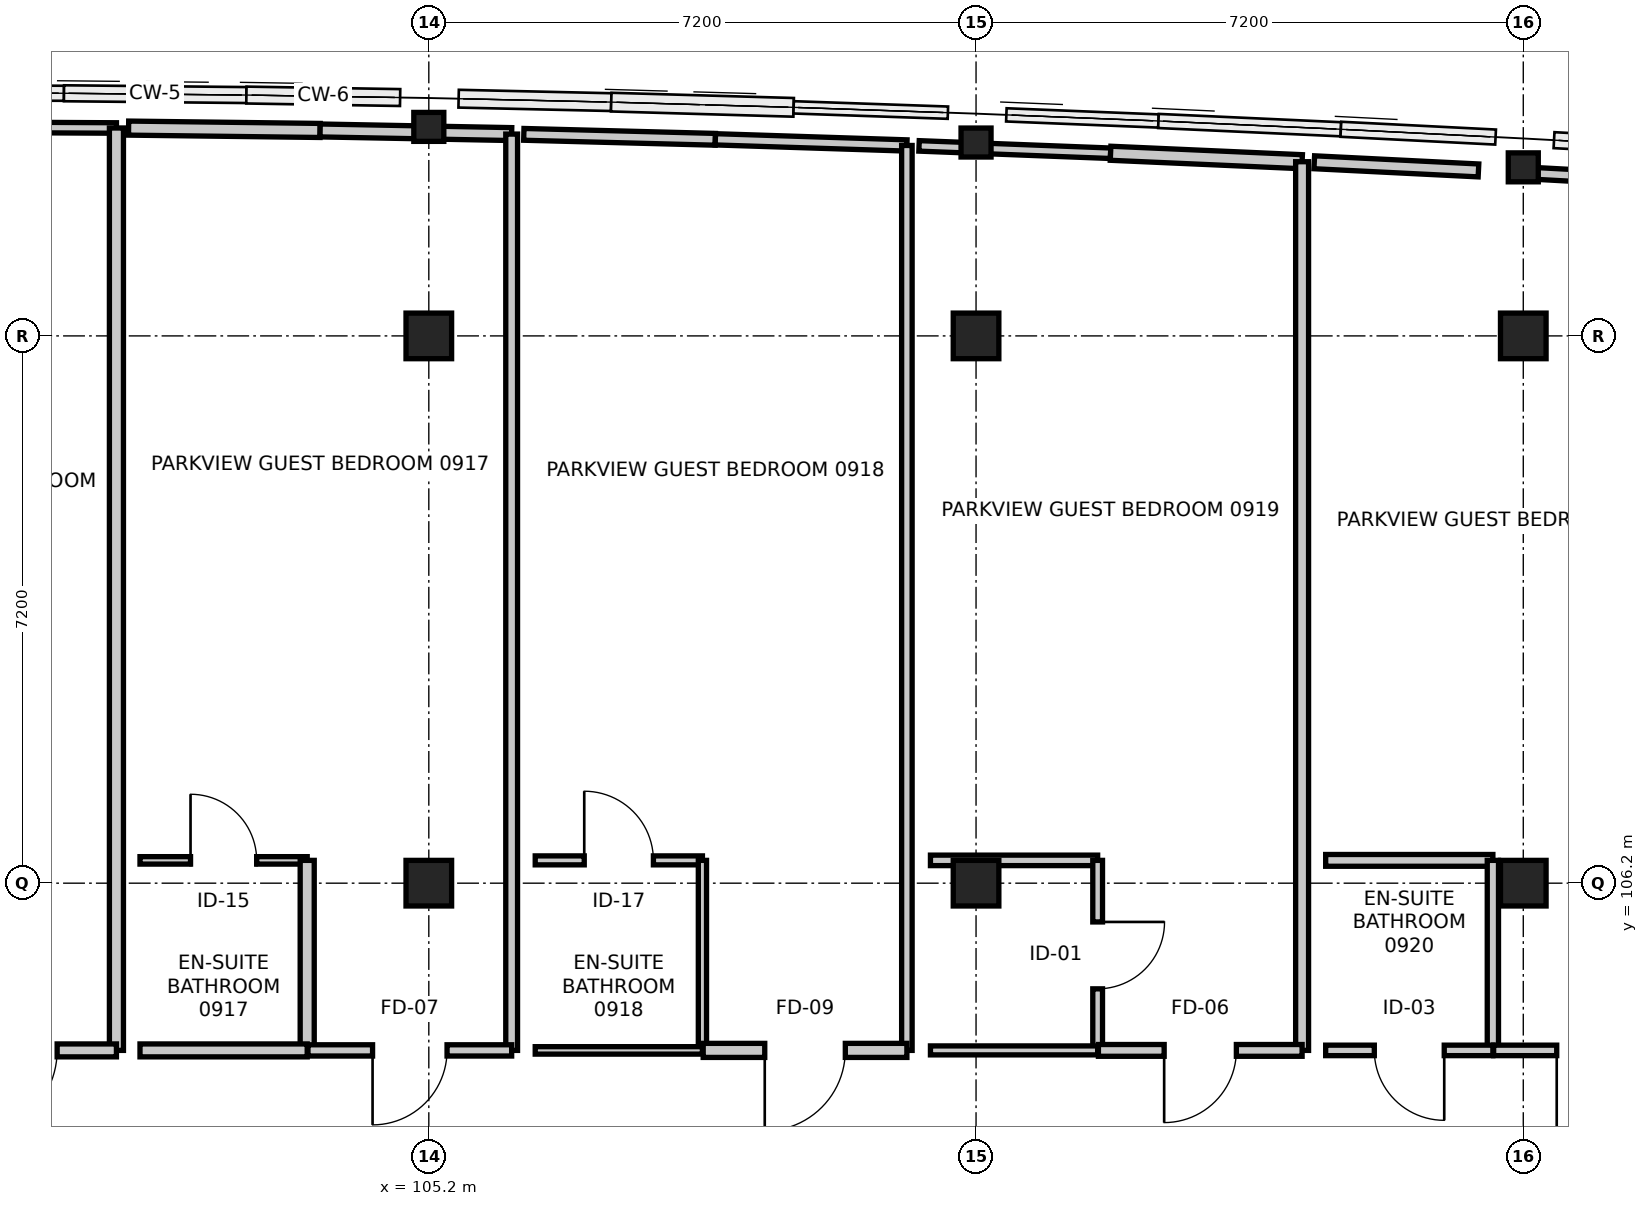
"""IFC4 building model, lengths in metres.
Left out: names, types, materials, properties, quantities, classifications, styles, units other than length and angle.
Written with IfcOpenShell. Run it as: python <this file> out.ifc"""

import sys

from ifc_helpers import new_model, si_unit, direction, frame, frame_2d, origin, origin_2d, place, context, subcontext, project, spatial, rectangle, i_section, extrude, element, fill, save


model = new_model("IFC4")
c1 = context("Model", 3, precision=1e-05, world=origin(), true_north=direction((0.0, 1.0)))
c2 = subcontext(c1, "Body", "Model", "MODEL_VIEW")
j1 = project(units=[si_unit("LENGTHUNIT", "METRE"), si_unit("PLANEANGLEUNIT", "RADIAN")], contexts=[c1])
p1 = place(None, origin())
s1 = spatial("IfcSite", under=j1, at=p1, CompositionType="ELEMENT")
p2 = place(p1, origin())
s2 = spatial("IfcBuilding", under=s1, at=p2, CompositionType="ELEMENT")
p3 = place(p2, frame((0.0, 0.0, 37.2)))
s3 = spatial("IfcBuildingStorey", under=s2, at=p3, CompositionType="ELEMENT", Elevation=37.2)
for number, where, z_axis, x_axis in (
    (1, (105.2, 106.2, 0.0), (0.0, 0.0, 1.0), (1.0, 0.0, 0.0)),
    (2, (105.2, 113.4, 0.0), (0.0, 0.0, 1.0), (1.0, 0.0, 0.0)),
):
    element("IfcColumn", number, at=place(p3, frame(where, z_axis=z_axis, x_axis=x_axis)), inside=s3, PredefinedType="COLUMN", context=c2, shape_type="SweptSolid", body=[
        extrude(rectangle(XDim=0.6, YDim=0.6, at=origin_2d()), origin(), (0.0, 0.0, 1.0), 3.6),
    ])
p4 = place(p3, frame((105.2, 116.15, 0.0), z_axis=(0.0, 0.0, 1.0), x_axis=(1.0, 0.0, 0.0)))
e3 = element("IfcColumn", 3, at=p4, inside=s3, PredefinedType="COLUMN", context=c2, shape_type="SweptSolid", body=[
    extrude(i_section(OverallWidth=0.395, OverallDepth=0.381, WebThickness=0.018, FlangeThickness=0.03, FilletRadius=0.015, at=origin_2d()), origin(), (0.0, 0.0, 1.0), 3.6),
])
for number, where, z_axis, x_axis in (
    (4, (112.4, 106.2, 0.0), (0.0, 0.0, 1.0), (1.0, 0.0, 0.0)),
    (5, (112.4, 113.4, 0.0), (0.0, 0.0, 1.0), (1.0, 0.0, 0.0)),
):
    element("IfcColumn", number, at=place(p3, frame(where, z_axis=z_axis, x_axis=x_axis)), inside=s3, PredefinedType="COLUMN", context=c2, shape_type="SweptSolid", body=[
        extrude(rectangle(XDim=0.6, YDim=0.6, at=origin_2d()), origin(), (0.0, 0.0, 1.0), 3.6),
    ])
p5 = place(p3, frame((112.4, 115.944, 0.0), z_axis=(0.0, 0.0, 1.0), x_axis=(1.0, 0.0, 0.0)))
e6 = element("IfcColumn", 6, at=p5, inside=s3, PredefinedType="COLUMN", context=c2, shape_type="SweptSolid", body=[
    extrude(i_section(OverallWidth=0.395, OverallDepth=0.381, WebThickness=0.018, FlangeThickness=0.03, FilletRadius=0.015, at=origin_2d()), origin(), (0.0, 0.0, 1.0), 3.6),
])
for number, where, z_axis, x_axis in (
    (7, (119.6, 106.2, 0.0), (0.0, 0.0, 1.0), (1.0, 0.0, 0.0)),
    (8, (119.6, 113.4, 0.0), (0.0, 0.0, 1.0), (1.0, 0.0, 0.0)),
):
    element("IfcColumn", number, at=place(p3, frame(where, z_axis=z_axis, x_axis=x_axis)), inside=s3, PredefinedType="COLUMN", context=c2, shape_type="SweptSolid", body=[
        extrude(rectangle(XDim=0.6, YDim=0.6, at=origin_2d()), origin(), (0.0, 0.0, 1.0), 3.6),
    ])
p6 = place(p3, frame((119.6, 115.618, 0.0), z_axis=(0.0, 0.0, 1.0), x_axis=(1.0, 0.0, 0.0)))
e9 = element("IfcColumn", 9, at=p6, inside=s3, PredefinedType="COLUMN", context=c2, shape_type="SweptSolid", body=[
    extrude(i_section(OverallWidth=0.395, OverallDepth=0.381, WebThickness=0.018, FlangeThickness=0.03, FilletRadius=0.015, at=origin_2d()), origin(), (0.0, 0.0, 1.0), 3.6),
])
p7 = place(p3, frame((98.57, 116.148, 0.0), z_axis=(0.0, 0.0, 1.0), x_axis=(0.999987310611, -0.005037719449, 0.0)))
e10 = element("IfcWall", 10, at=p7, inside=s3, PredefinedType="PARTITIONING", context=c2, shape_type="SweptSolid", body=[
    extrude(rectangle(XDim=2.52, YDim=0.138, at=frame_2d((1.26, 0.0))), origin(), (0.0, 0.0, 1.0), 2.956),
])
p8 = place(p3, frame((101.09, 116.135, 0.0), z_axis=(0.0, 0.0, 1.0), x_axis=(0.0, -1.0, 0.0)))
e11 = element("IfcWall", 11, at=p8, inside=s3, PredefinedType="PARTITIONING", context=c2, shape_type="SweptSolid", body=[
    extrude(rectangle(XDim=12.135, YDim=0.185, at=frame_2d((6.068, 0.0))), origin(), (0.0, 0.0, 1.0), 2.765),
])
p9 = place(p3, frame((101.09, 104.0, 0.0), z_axis=(0.0, 0.0, 1.0), x_axis=(-1.0, 0.0, 0.0)))
e12 = element("IfcWall", 12, at=p9, inside=s3, PredefinedType="PARTITIONING", context=c2, shape_type="SweptSolid", body=[
    extrude(rectangle(XDim=2.68, YDim=0.17, at=frame_2d((1.34, 0.0))), origin(), (0.0, 0.0, 1.0), 3.38),
])
p10 = place(p9, frame((0.78, 0.0, 0.0)))
e13 = element("IfcOpeningElement", 13, at=p10, cuts=e12, PredefinedType="OPENING", context=c2, shape_type="SweptSolid", body=[
    extrude(rectangle(XDim=1.12, YDim=2.2, at=frame_2d((0.56, 1.1))), frame((0.0, 0.095, 0.0), z_axis=(0.0, -1.0, 0.0), x_axis=(1.0, 0.0, 0.0)), (0.0, 0.0, 1.0), 0.19),
])
p11 = place(p3, frame((101.4, 106.5, 0.0), z_axis=(0.0, 0.0, 1.0), x_axis=(1.0, 0.0, 0.0)))
e14 = element("IfcWall", 14, at=p11, inside=s3, PredefinedType="PARTITIONING", context=c2, shape_type="SweptSolid", body=[
    extrude(rectangle(XDim=2.2, YDim=0.098, at=frame_2d((1.1, 0.0))), origin(), (0.0, 0.0, 1.0), 3.38),
])
p12 = place(p11, frame((0.665, 0.0, 0.0)))
e15 = element("IfcOpeningElement", 15, at=p12, cuts=e14, PredefinedType="OPENING", context=c2, shape_type="SweptSolid", body=[
    extrude(rectangle(XDim=0.87, YDim=2.07, at=frame_2d((0.435, 1.035))), frame((0.0, 0.059, 0.0), z_axis=(0.0, -1.0, 0.0), x_axis=(1.0, 0.0, 0.0)), (0.0, 0.0, 1.0), 0.118),
])
p13 = place(p3, frame((103.6, 106.5, 0.0), z_axis=(0.0, 0.0, 1.0), x_axis=(0.0, -1.0, 0.0)))
e16 = element("IfcWall", 16, at=p13, inside=s3, PredefinedType="PARTITIONING", context=c2, shape_type="SweptSolid", body=[
    extrude(rectangle(XDim=2.5, YDim=0.185, at=frame_2d((1.25, 0.0))), origin(), (0.0, 0.0, 1.0), 2.765),
])
p14 = place(p3, frame((103.6, 104.0, 0.0), z_axis=(0.0, 0.0, 1.0), x_axis=(-1.0, 0.0, 0.0)))
e17 = element("IfcWall", 17, at=p14, inside=s3, PredefinedType="PARTITIONING", context=c2, shape_type="SweptSolid", body=[
    extrude(rectangle(XDim=2.2, YDim=0.17, at=frame_2d((1.1, 0.0))), origin(), (0.0, 0.0, 1.0), 3.38),
])
p15 = place(p3, frame((101.25, 116.134, 0.0), z_axis=(0.0, 0.0, 1.0), x_axis=(0.999925503674, -0.012206027268, 0.0)))
e18 = element("IfcWall", 18, at=p15, inside=s3, PredefinedType="PARTITIONING", context=c2, shape_type="SweptSolid", body=[
    extrude(rectangle(XDim=2.52, YDim=0.185, at=frame_2d((1.26, 0.0))), origin(), (0.0, 0.0, 1.0), 2.956),
])
p16 = place(p3, frame((103.77, 116.103, 0.0), z_axis=(0.0, 0.0, 1.0), x_axis=(0.999819765879, -0.018985145719, 0.0)))
e19 = element("IfcWall", 19, at=p16, inside=s3, PredefinedType="PARTITIONING", context=c2, shape_type="SweptSolid", body=[
    extrude(rectangle(XDim=2.521, YDim=0.17, at=frame_2d((1.26, 0.0))), origin(), (0.0, 0.0, 1.0), 2.956),
])
p17 = place(p3, frame((106.29, 116.055, 0.0), z_axis=(0.0, 0.0, 1.0), x_axis=(0.0, -1.0, 0.0)))
e20 = element("IfcWall", 20, at=p17, inside=s3, PredefinedType="PARTITIONING", context=c2, shape_type="SweptSolid", body=[
    extrude(rectangle(XDim=12.055, YDim=0.155, at=frame_2d((6.028, 0.0))), origin(), (0.0, 0.0, 1.0), 2.765),
])
p18 = place(p3, frame((106.29, 104.0, 0.0), z_axis=(0.0, 0.0, 1.0), x_axis=(-1.0, 0.0, 0.0)))
e21 = element("IfcWall", 21, at=p18, inside=s3, PredefinedType="PARTITIONING", context=c2, shape_type="SweptSolid", body=[
    extrude(rectangle(XDim=2.68, YDim=0.148, at=frame_2d((1.34, 0.0))), origin(), (0.0, 0.0, 1.0), 2.715),
])
p19 = place(p18, frame((0.85, 0.0, 0.0)))
e22 = element("IfcOpeningElement", 22, at=p19, cuts=e21, PredefinedType="OPENING", context=c2, shape_type="SweptSolid", body=[
    extrude(rectangle(XDim=0.98, YDim=2.15, at=frame_2d((0.49, 1.075))), frame((0.0, 0.084, 0.0), z_axis=(0.0, -1.0, 0.0), x_axis=(1.0, 0.0, 0.0)), (0.0, 0.0, 1.0), 0.168),
])
p20 = place(p3, frame((106.6, 106.5, 0.0), z_axis=(0.0, 0.0, 1.0), x_axis=(1.0, 0.0, 0.0)))
e23 = element("IfcWall", 23, at=p20, inside=s3, PredefinedType="PARTITIONING", context=c2, shape_type="SweptSolid", body=[
    extrude(rectangle(XDim=2.2, YDim=0.118, at=frame_2d((1.1, 0.0))), origin(), (0.0, 0.0, 1.0), 3.38),
])
p21 = place(p20, frame((0.645, 0.0, 0.0)))
e24 = element("IfcOpeningElement", 24, at=p21, cuts=e23, PredefinedType="OPENING", context=c2, shape_type="SweptSolid", body=[
    extrude(rectangle(XDim=0.91, YDim=2.11, at=frame_2d((0.455, 1.055))), frame((0.0, 0.069, 0.0), z_axis=(0.0, -1.0, 0.0), x_axis=(1.0, 0.0, 0.0)), (0.0, 0.0, 1.0), 0.138),
])
p22 = place(p3, frame((108.8, 106.5, 0.0), z_axis=(0.0, 0.0, 1.0), x_axis=(0.0, -1.0, 0.0)))
e25 = element("IfcWall", 25, at=p22, inside=s3, PredefinedType="PARTITIONING", context=c2, shape_type="SweptSolid", body=[
    extrude(rectangle(XDim=2.5, YDim=0.108, at=frame_2d((1.25, 0.0))), origin(), (0.0, 0.0, 1.0), 2.765),
])
p23 = place(p3, frame((108.8, 104.0, 0.0), z_axis=(0.0, 0.0, 1.0), x_axis=(-1.0, 0.0, 0.0)))
e26 = element("IfcWall", 26, at=p23, inside=s3, PredefinedType="PARTITIONING", context=c2, shape_type="SweptSolid", body=[
    extrude(rectangle(XDim=2.2, YDim=0.098, at=frame_2d((1.1, 0.0))), origin(), (0.0, 0.0, 1.0), 3.38),
])
p24 = place(p3, frame((106.45, 116.052, 0.0), z_axis=(0.0, 0.0, 1.0), x_axis=(0.99966561488, -0.025858430457, 0.0)))
e27 = element("IfcWall", 27, at=p24, inside=s3, PredefinedType="PARTITIONING", context=c2, shape_type="SweptSolid", body=[
    extrude(rectangle(XDim=2.521, YDim=0.155, at=frame_2d((1.26, 0.0))), origin(), (0.0, 0.0, 1.0), 2.956),
])
p25 = place(p3, frame((108.97, 115.986, 0.0), z_axis=(0.0, 0.0, 1.0), x_axis=(0.999486236207, -0.032050953709, 0.0)))
e28 = element("IfcWall", 28, at=p25, inside=s3, PredefinedType="PARTITIONING", context=c2, shape_type="SweptSolid", body=[
    extrude(rectangle(XDim=2.521, YDim=0.148, at=frame_2d((1.261, 0.0))), origin(), (0.0, 0.0, 1.0), 2.956),
])
p26 = place(p3, frame((111.49, 115.906, 0.0), z_axis=(0.0, 0.0, 1.0), x_axis=(0.0, -1.0, 0.0)))
e29 = element("IfcWall", 29, at=p26, inside=s3, PredefinedType="PARTITIONING", context=c2, shape_type="SweptSolid", body=[
    extrude(rectangle(XDim=11.906, YDim=0.138, at=frame_2d((5.953, 0.0))), origin(), (0.0, 0.0, 1.0), 2.765),
])
p27 = place(p3, frame((111.49, 104.0, 0.0), z_axis=(0.0, 0.0, 1.0), x_axis=(-1.0, 0.0, 0.0)))
e30 = element("IfcWall", 30, at=p27, inside=s3, PredefinedType="PARTITIONING", context=c2, shape_type="SweptSolid", body=[
    extrude(rectangle(XDim=2.68, YDim=0.185, at=frame_2d((1.34, 0.0))), origin(), (0.0, 0.0, 1.0), 3.38),
])
p28 = place(p27, frame((0.81, 0.0, 0.0)))
e31 = element("IfcOpeningElement", 31, at=p28, cuts=e30, PredefinedType="OPENING", context=c2, shape_type="SweptSolid", body=[
    extrude(rectangle(XDim=1.06, YDim=2.2, at=frame_2d((0.53, 1.1))), frame((0.0, 0.103, 0.0), z_axis=(0.0, -1.0, 0.0), x_axis=(1.0, 0.0, 0.0)), (0.0, 0.0, 1.0), 0.205),
])
p29 = place(p3, frame((111.8, 106.5, 0.0), z_axis=(0.0, 0.0, 1.0), x_axis=(1.0, 0.0, 0.0)))
e32 = element("IfcWall", 32, at=p29, inside=s3, PredefinedType="PARTITIONING", context=c2, shape_type="SweptSolid", body=[
    extrude(rectangle(XDim=2.2, YDim=0.138, at=frame_2d((1.1, 0.0))), origin(), (0.0, 0.0, 1.0), 2.715),
])
p30 = place(p3, frame((114.0, 106.5, 0.0), z_axis=(0.0, 0.0, 1.0), x_axis=(0.0, -1.0, 0.0)))
e33 = element("IfcWall", 33, at=p30, inside=s3, PredefinedType="PARTITIONING", context=c2, shape_type="SweptSolid", body=[
    extrude(rectangle(XDim=2.5, YDim=0.128, at=frame_2d((1.25, 0.0))), origin(), (0.0, 0.0, 1.0), 2.765),
])
p31 = place(p30, frame((0.81, 0.0, 0.0)))
e34 = element("IfcOpeningElement", 34, at=p31, cuts=e33, PredefinedType="OPENING", context=c2, shape_type="SweptSolid", body=[
    extrude(rectangle(XDim=0.88, YDim=2.06, at=frame_2d((0.44, 1.03))), frame((0.0, 0.074, 0.0), z_axis=(0.0, -1.0, 0.0), x_axis=(1.0, 0.0, 0.0)), (0.0, 0.0, 1.0), 0.148),
])
p32 = place(p3, frame((114.0, 104.0, 0.0), z_axis=(0.0, 0.0, 1.0), x_axis=(-1.0, 0.0, 0.0)))
e35 = element("IfcWall", 35, at=p32, inside=s3, PredefinedType="PARTITIONING", context=c2, shape_type="SweptSolid", body=[
    extrude(rectangle(XDim=2.2, YDim=0.118, at=frame_2d((1.1, 0.0))), origin(), (0.0, 0.0, 1.0), 2.715),
])
p33 = place(p3, frame((111.65, 115.9, 0.0), z_axis=(0.0, 0.0, 1.0), x_axis=(0.999261174631, -0.038433122101, 0.0)))
e36 = element("IfcWall", 36, at=p33, inside=s3, PredefinedType="PARTITIONING", context=c2, shape_type="SweptSolid", body=[
    extrude(rectangle(XDim=2.522, YDim=0.138, at=frame_2d((1.261, 0.0))), origin(), (0.0, 0.0, 1.0), 2.956),
])
p34 = place(p3, frame((114.17, 115.803, 0.0), z_axis=(0.0, 0.0, 1.0), x_axis=(0.999025600943, -0.044134438484, 0.0)))
e37 = element("IfcWall", 37, at=p34, inside=s3, PredefinedType="PARTITIONING", context=c2, shape_type="SweptSolid", body=[
    extrude(rectangle(XDim=2.522, YDim=0.185, at=frame_2d((1.261, 0.0))), origin(), (0.0, 0.0, 1.0), 2.956),
])
p35 = place(p3, frame((116.69, 115.692, 0.0), z_axis=(0.0, 0.0, 1.0), x_axis=(0.0, -1.0, 0.0)))
e38 = element("IfcWall", 38, at=p35, inside=s3, PredefinedType="PARTITIONING", context=c2, shape_type="SweptSolid", body=[
    extrude(rectangle(XDim=11.692, YDim=0.17, at=frame_2d((5.846, 0.0))), origin(), (0.0, 0.0, 1.0), 2.765),
])
p36 = place(p3, frame((116.69, 104.0, 0.0), z_axis=(0.0, 0.0, 1.0), x_axis=(-1.0, 0.0, 0.0)))
e39 = element("IfcWall", 39, at=p36, inside=s3, PredefinedType="PARTITIONING", context=c2, shape_type="SweptSolid", body=[
    extrude(rectangle(XDim=2.68, YDim=0.155, at=frame_2d((1.34, 0.0))), origin(), (0.0, 0.0, 1.0), 3.38),
])
p37 = place(p36, frame((0.865, 0.0, 0.0)))
e40 = element("IfcOpeningElement", 40, at=p37, cuts=e39, PredefinedType="OPENING", context=c2, shape_type="SweptSolid", body=[
    extrude(rectangle(XDim=0.95, YDim=2.1, at=frame_2d((0.475, 1.05))), frame((0.0, 0.087, 0.0), z_axis=(0.0, -1.0, 0.0), x_axis=(1.0, 0.0, 0.0)), (0.0, 0.0, 1.0), 0.175),
])
p38 = place(p3, frame((117.0, 106.5, 0.0), z_axis=(0.0, 0.0, 1.0), x_axis=(1.0, 0.0, 0.0)))
e41 = element("IfcWall", 41, at=p38, inside=s3, PredefinedType="PARTITIONING", context=c2, shape_type="SweptSolid", body=[
    extrude(rectangle(XDim=2.2, YDim=0.155, at=frame_2d((1.1, 0.0))), origin(), (0.0, 0.0, 1.0), 3.38),
])
p39 = place(p3, frame((119.2, 106.5, 0.0), z_axis=(0.0, 0.0, 1.0), x_axis=(0.0, -1.0, 0.0)))
e42 = element("IfcWall", 42, at=p39, inside=s3, PredefinedType="PARTITIONING", context=c2, shape_type="SweptSolid", body=[
    extrude(rectangle(XDim=2.5, YDim=0.148, at=frame_2d((1.25, 0.0))), origin(), (0.0, 0.0, 1.0), 2.765),
])
p40 = place(p3, frame((119.2, 104.0, 0.0), z_axis=(0.0, 0.0, 1.0), x_axis=(-1.0, 0.0, 0.0)))
e43 = element("IfcWall", 43, at=p40, inside=s3, PredefinedType="PARTITIONING", context=c2, shape_type="SweptSolid", body=[
    extrude(rectangle(XDim=2.2, YDim=0.138, at=frame_2d((1.1, 0.0))), origin(), (0.0, 0.0, 1.0), 3.38),
])
p41 = place(p40, frame((0.64, 0.0, 0.0)))
e44 = element("IfcOpeningElement", 44, at=p41, cuts=e43, PredefinedType="OPENING", context=c2, shape_type="SweptSolid", body=[
    extrude(rectangle(XDim=0.92, YDim=2.1, at=frame_2d((0.46, 1.05))), frame((0.0, 0.079, 0.0), z_axis=(0.0, -1.0, 0.0), x_axis=(1.0, 0.0, 0.0)), (0.0, 0.0, 1.0), 0.158),
])
p42 = place(p3, frame((116.85, 115.684, 0.0), z_axis=(0.0, 0.0, 1.0), x_axis=(0.998771684577, -0.049549188556, 0.0)))
e45 = element("IfcWall", 45, at=p42, inside=s3, PredefinedType="PARTITIONING", context=c2, shape_type="SweptSolid", body=[
    extrude(rectangle(XDim=2.163, YDim=0.17, at=frame_2d((1.082, 0.0))), origin(), (0.0, 0.0, 1.0), 2.956),
])
p43 = place(p3, frame((119.729, 115.54, 0.0), z_axis=(0.0, 0.0, 1.0), x_axis=(0.99851983335, -0.054388807738, 0.0)))
e46 = element("IfcWall", 46, at=p43, inside=s3, PredefinedType="PARTITIONING", context=c2, shape_type="SweptSolid", body=[
    extrude(rectangle(XDim=2.164, YDim=0.155, at=frame_2d((1.082, 0.0))), origin(), (0.0, 0.0, 1.0), 2.956),
])
p44 = place(p3, frame((121.89, 104.0, 0.0), z_axis=(0.0, 0.0, 1.0), x_axis=(-1.0, 0.0, 0.0)))
e47 = element("IfcWall", 47, at=p44, inside=s3, PredefinedType="PARTITIONING", context=c2, shape_type="SweptSolid", body=[
    extrude(rectangle(XDim=2.68, YDim=0.138, at=frame_2d((1.34, 0.0))), origin(), (0.0, 0.0, 1.0), 2.715),
])
p45 = place(p44, frame((0.83, 0.0, 0.0)))
e48 = element("IfcOpeningElement", 48, at=p45, cuts=e47, PredefinedType="OPENING", context=c2, shape_type="SweptSolid", body=[
    extrude(rectangle(XDim=1.02, YDim=2.15, at=frame_2d((0.51, 1.075))), frame((0.0, 0.079, 0.0), z_axis=(0.0, -1.0, 0.0), x_axis=(1.0, 0.0, 0.0)), (0.0, 0.0, 1.0), 0.158),
])
p46 = place(p10, origin())
e49 = element("IfcDoor", 49, at=p46, inside=s3, OperationType="SINGLE_SWING_RIGHT", PredefinedType="DOOR", context=c2, shape_type="SweptSolid", body=[
    extrude(rectangle(XDim=1.12, YDim=2.2, at=frame_2d((0.56, 1.1))), frame((0.0, 0.025, 0.0), z_axis=(0.0, -1.0, 0.0), x_axis=(1.0, 0.0, 0.0)), (0.0, 0.0, 1.0), 0.05),
])
fill(e13, e49)
p47 = place(p12, origin())
e50 = element("IfcDoor", 50, at=p47, inside=s3, OperationType="SINGLE_SWING_LEFT", PredefinedType="DOOR", context=c2, shape_type="SweptSolid", body=[
    extrude(rectangle(XDim=0.87, YDim=2.07, at=frame_2d((0.435, 1.035))), frame((0.0, 0.025, 0.0), z_axis=(0.0, -1.0, 0.0), x_axis=(1.0, 0.0, 0.0)), (0.0, 0.0, 1.0), 0.05),
])
fill(e15, e50)
p48 = place(p19, origin())
e51 = element("IfcDoor", 51, at=p48, inside=s3, OperationType="SINGLE_SWING_RIGHT", PredefinedType="DOOR", context=c2, shape_type="SweptSolid", body=[
    extrude(rectangle(XDim=0.98, YDim=2.15, at=frame_2d((0.49, 1.075))), frame((0.0, 0.025, 0.0), z_axis=(0.0, -1.0, 0.0), x_axis=(1.0, 0.0, 0.0)), (0.0, 0.0, 1.0), 0.05),
])
fill(e22, e51)
p49 = place(p21, origin())
e52 = element("IfcDoor", 52, at=p49, inside=s3, OperationType="SINGLE_SWING_LEFT", PredefinedType="DOOR", context=c2, shape_type="SweptSolid", body=[
    extrude(rectangle(XDim=0.91, YDim=2.11, at=frame_2d((0.455, 1.055))), frame((0.0, 0.025, 0.0), z_axis=(0.0, -1.0, 0.0), x_axis=(1.0, 0.0, 0.0)), (0.0, 0.0, 1.0), 0.05),
])
fill(e24, e52)
p50 = place(p28, origin())
e53 = element("IfcDoor", 53, at=p50, inside=s3, OperationType="SINGLE_SWING_RIGHT", PredefinedType="DOOR", context=c2, shape_type="SweptSolid", body=[
    extrude(rectangle(XDim=1.06, YDim=2.2, at=frame_2d((0.53, 1.1))), frame((0.0, 0.025, 0.0), z_axis=(0.0, -1.0, 0.0), x_axis=(1.0, 0.0, 0.0)), (0.0, 0.0, 1.0), 0.05),
])
fill(e31, e53)
p51 = place(p31, origin())
e54 = element("IfcDoor", 54, at=p51, inside=s3, OperationType="SINGLE_SWING_LEFT", PredefinedType="DOOR", context=c2, shape_type="SweptSolid", body=[
    extrude(rectangle(XDim=0.88, YDim=2.06, at=frame_2d((0.44, 1.03))), frame((0.0, 0.025, 0.0), z_axis=(0.0, -1.0, 0.0), x_axis=(1.0, 0.0, 0.0)), (0.0, 0.0, 1.0), 0.05),
])
fill(e34, e54)
p52 = place(p37, origin())
e55 = element("IfcDoor", 55, at=p52, inside=s3, OperationType="SINGLE_SWING_RIGHT", PredefinedType="DOOR", context=c2, shape_type="SweptSolid", body=[
    extrude(rectangle(XDim=0.95, YDim=2.1, at=frame_2d((0.475, 1.05))), frame((0.0, 0.025, 0.0), z_axis=(0.0, -1.0, 0.0), x_axis=(1.0, 0.0, 0.0)), (0.0, 0.0, 1.0), 0.05),
])
fill(e40, e55)
p53 = place(p41, origin())
e56 = element("IfcDoor", 56, at=p53, inside=s3, OperationType="SINGLE_SWING_LEFT", PredefinedType="DOOR", context=c2, shape_type="SweptSolid", body=[
    extrude(rectangle(XDim=0.92, YDim=2.1, at=frame_2d((0.46, 1.05))), frame((0.0, 0.025, 0.0), z_axis=(0.0, -1.0, 0.0), x_axis=(1.0, 0.0, 0.0)), (0.0, 0.0, 1.0), 0.05),
])
fill(e44, e56)
p54 = place(p45, origin())
e57 = element("IfcDoor", 57, at=p54, inside=s3, OperationType="SINGLE_SWING_RIGHT", PredefinedType="DOOR", context=c2, shape_type="SweptSolid", body=[
    extrude(rectangle(XDim=1.02, YDim=2.15, at=frame_2d((0.51, 1.075))), frame((0.0, 0.025, 0.0), z_axis=(0.0, -1.0, 0.0), x_axis=(1.0, 0.0, 0.0)), (0.0, 0.0, 1.0), 0.05),
])
fill(e48, e57)
save(model, sys.argv[1])
